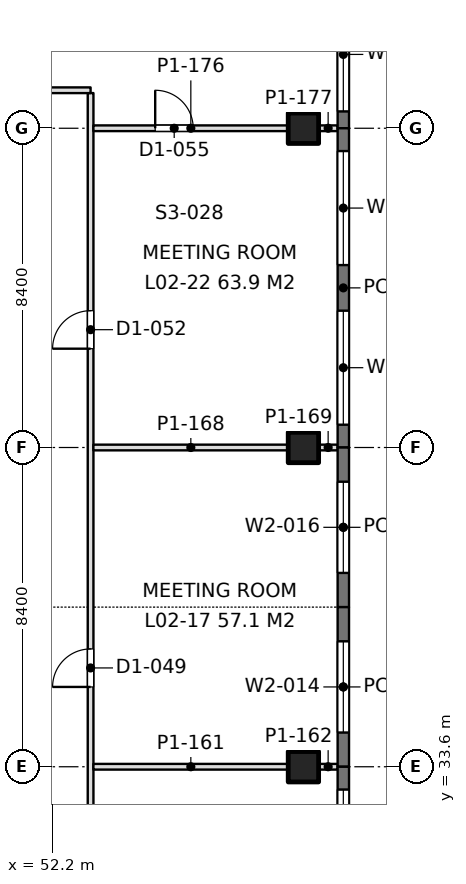
"""IFC4 building model, lengths in metres.
Left out: names, types, materials, properties, quantities, classifications, styles, units other than length and angle.
Written with IfcOpenShell. Run it as: python <this file> out.ifc"""

import sys

from ifc_helpers import new_model, si_unit, direction, frame, frame_2d, origin, origin_2d, place, context, subcontext, project, spatial, rectangle, extrude, element, fill, save


model = new_model("IFC4")
c1 = context("Model", 3, precision=1e-05, world=origin(), true_north=direction((0.0, 1.0)))
c2 = subcontext(c1, "Body", "Model", "MODEL_VIEW")
j1 = project(units=[si_unit("LENGTHUNIT", "METRE"), si_unit("PLANEANGLEUNIT", "RADIAN")], contexts=[c1])
p1 = place(None, origin())
s1 = spatial("IfcSite", under=j1, at=p1, CompositionType="ELEMENT")
p2 = place(p1, origin())
s2 = spatial("IfcBuilding", under=s1, at=p2, CompositionType="ELEMENT")
p3 = place(p2, frame((0.0, 0.0, 9.9)))
s3 = spatial("IfcBuildingStorey", under=s2, at=p3, CompositionType="ELEMENT", Elevation=9.9)
for number, where, z_axis, x_axis in (
    (1, (58.8, 33.6, 0.0), (0.0, 0.0, 1.0), (1.0, 0.0, 0.0)),
    (2, (58.8, 42.0, 0.0), (0.0, 0.0, 1.0), (1.0, 0.0, 0.0)),
    (3, (58.8, 50.4, 0.0), (0.0, 0.0, 1.0), (1.0, 0.0, 0.0)),
):
    element("IfcColumn", number, at=place(p3, frame(where, z_axis=z_axis, x_axis=x_axis)), inside=s3, PredefinedType="COLUMN", context=c2, shape_type="SweptSolid", body=[
        extrude(rectangle(XDim=0.8, YDim=0.8, at=origin_2d()), origin(), (0.0, 0.0, 1.0), 4.5),
    ])
p4 = place(p3, frame((59.85, 58.485, 0.0), z_axis=(0.0, 0.0, 1.0), x_axis=(0.0, -1.0, 0.0)))
e4 = element("IfcWall", 4, at=p4, inside=s3, PredefinedType="SOLIDWALL", context=c2, shape_type="SweptSolid", body=[
    extrude(rectangle(XDim=8.085, YDim=0.3, at=frame_2d((4.042, 0.0))), origin(), (0.0, 0.0, 1.0), 4.3),
])
p5 = place(p4, frame((0.443, 0.0, 0.9)))
e5 = element("IfcOpeningElement", 5, at=p5, cuts=e4, PredefinedType="OPENING", context=c2, shape_type="SweptSolid", body=[
    extrude(rectangle(XDim=3.0, YDim=2.4, at=frame_2d((1.5, 1.2))), frame((0.0, 0.16, 0.0), z_axis=(0.0, -1.0, 0.0), x_axis=(1.0, 0.0, 0.0)), (0.0, 0.0, 1.0), 0.32),
])
p6 = place(p4, frame((4.643, 0.0, 0.9)))
e6 = element("IfcOpeningElement", 6, at=p6, cuts=e4, PredefinedType="OPENING", context=c2, shape_type="SweptSolid", body=[
    extrude(rectangle(XDim=3.0, YDim=2.4, at=frame_2d((1.5, 1.2))), frame((0.0, 0.16, 0.0), z_axis=(0.0, -1.0, 0.0), x_axis=(1.0, 0.0, 0.0)), (0.0, 0.0, 1.0), 0.32),
])
p7 = place(p3, frame((59.85, 50.4, 0.0), z_axis=(0.0, 0.0, 1.0), x_axis=(0.0, -1.0, 0.0)))
e7 = element("IfcWall", 7, at=p7, inside=s3, PredefinedType="SOLIDWALL", context=c2, shape_type="SweptSolid", body=[
    extrude(rectangle(XDim=8.4, YDim=0.3, at=frame_2d((4.2, 0.0))), origin(), (0.0, 0.0, 1.0), 4.3),
])
p8 = place(p7, frame((0.6, 0.0, 0.9)))
e8 = element("IfcOpeningElement", 8, at=p8, cuts=e7, PredefinedType="OPENING", context=c2, shape_type="SweptSolid", body=[
    extrude(rectangle(XDim=3.0, YDim=2.4, at=frame_2d((1.5, 1.2))), frame((0.0, 0.16, 0.0), z_axis=(0.0, -1.0, 0.0), x_axis=(1.0, 0.0, 0.0)), (0.0, 0.0, 1.0), 0.32),
])
p9 = place(p7, frame((4.8, 0.0, 0.9)))
e9 = element("IfcOpeningElement", 9, at=p9, cuts=e7, PredefinedType="OPENING", context=c2, shape_type="SweptSolid", body=[
    extrude(rectangle(XDim=3.0, YDim=2.4, at=frame_2d((1.5, 1.2))), frame((0.0, 0.16, 0.0), z_axis=(0.0, -1.0, 0.0), x_axis=(1.0, 0.0, 0.0)), (0.0, 0.0, 1.0), 0.32),
])
p10 = place(p3, frame((59.85, 42.0, 0.0), z_axis=(0.0, 0.0, 1.0), x_axis=(0.0, -1.0, 0.0)))
e10 = element("IfcWall", 10, at=p10, inside=s3, PredefinedType="SOLIDWALL", context=c2, shape_type="SweptSolid", body=[
    extrude(rectangle(XDim=4.2, YDim=0.3, at=frame_2d((2.1, 0.0))), origin(), (0.0, 0.0, 1.0), 4.3),
])
p11 = place(p10, frame((0.9, 0.0, 0.9)))
e11 = element("IfcOpeningElement", 11, at=p11, cuts=e10, PredefinedType="OPENING", context=c2, shape_type="SweptSolid", body=[
    extrude(rectangle(XDim=2.4, YDim=1.9, at=frame_2d((1.2, 0.95))), frame((0.0, 0.16, 0.0), z_axis=(0.0, -1.0, 0.0), x_axis=(1.0, 0.0, 0.0)), (0.0, 0.0, 1.0), 0.32),
])
p12 = place(p3, frame((59.85, 37.8, 0.0), z_axis=(0.0, 0.0, 1.0), x_axis=(0.0, -1.0, 0.0)))
e12 = element("IfcWall", 12, at=p12, inside=s3, PredefinedType="SOLIDWALL", context=c2, shape_type="SweptSolid", body=[
    extrude(rectangle(XDim=4.2, YDim=0.3, at=frame_2d((2.1, 0.0))), origin(), (0.0, 0.0, 1.0), 4.3),
])
p13 = place(p12, frame((0.9, 0.0, 0.9)))
e13 = element("IfcOpeningElement", 13, at=p13, cuts=e12, PredefinedType="OPENING", context=c2, shape_type="SweptSolid", body=[
    extrude(rectangle(XDim=2.4, YDim=1.9, at=frame_2d((1.2, 0.95))), frame((0.0, 0.16, 0.0), z_axis=(0.0, -1.0, 0.0), x_axis=(1.0, 0.0, 0.0)), (0.0, 0.0, 1.0), 0.32),
])
p14 = place(p3, frame((59.85, 33.6, 0.0), z_axis=(0.0, 0.0, 1.0), x_axis=(0.0, -1.0, 0.0)))
e14 = element("IfcWall", 14, at=p14, inside=s3, PredefinedType="SOLIDWALL", context=c2, shape_type="SweptSolid", body=[
    extrude(rectangle(XDim=8.4, YDim=0.3, at=frame_2d((4.2, 0.0))), origin(), (0.0, 0.0, 1.0), 4.3),
])
p15 = place(p14, frame((0.6, 0.0, 0.9)))
e15 = element("IfcOpeningElement", 15, at=p15, cuts=e14, PredefinedType="OPENING", context=c2, shape_type="SweptSolid", body=[
    extrude(rectangle(XDim=3.0, YDim=2.4, at=frame_2d((1.5, 1.2))), frame((0.0, 0.16, 0.0), z_axis=(0.0, -1.0, 0.0), x_axis=(1.0, 0.0, 0.0)), (0.0, 0.0, 1.0), 0.32),
])
p16 = place(p14, frame((4.8, 0.0, 0.9)))
e16 = element("IfcOpeningElement", 16, at=p16, cuts=e14, PredefinedType="OPENING", context=c2, shape_type="SweptSolid", body=[
    extrude(rectangle(XDim=3.0, YDim=2.4, at=frame_2d((1.5, 1.2))), frame((0.0, 0.16, 0.0), z_axis=(0.0, -1.0, 0.0), x_axis=(1.0, 0.0, 0.0)), (0.0, 0.0, 1.0), 0.32),
])
p17 = place(p3, frame((49.02, 51.4, 0.0), z_axis=(0.0, 0.0, 1.0), x_axis=(1.0, 0.0, 0.0)))
e17 = element("IfcWall", 17, at=p17, inside=s3, PredefinedType="PARTITIONING", context=c2, shape_type="SweptSolid", body=[
    extrude(rectangle(XDim=4.18, YDim=0.15, at=frame_2d((2.09, 0.0))), origin(), (0.0, 0.0, 1.0), 3.65),
])
p18 = place(p3, frame((53.274, 50.4, 0.0), z_axis=(0.0, 0.0, 1.0), x_axis=(1.0, 0.0, 0.0)))
e18 = element("IfcWall", 18, at=p18, inside=s3, PredefinedType="PARTITIONING", context=c2, shape_type="SweptSolid", body=[
    extrude(rectangle(XDim=5.127, YDim=0.15, at=frame_2d((2.563, 0.0))), origin(), (0.0, 0.0, 1.0), 3.65),
])
p19 = place(p18, frame((1.626, 0.0, 0.0)))
e19 = element("IfcOpeningElement", 19, at=p19, cuts=e18, PredefinedType="OPENING", context=c2, shape_type="SweptSolid", body=[
    extrude(rectangle(XDim=1.0, YDim=2.2, at=frame_2d((0.5, 1.1))), frame((0.0, 0.085, 0.0), z_axis=(0.0, -1.0, 0.0), x_axis=(1.0, 0.0, 0.0)), (0.0, 0.0, 1.0), 0.17),
])
p20 = place(p3, frame((59.199, 50.4, 0.0), z_axis=(0.0, 0.0, 1.0), x_axis=(1.0, 0.0, 0.0)))
e20 = element("IfcWall", 20, at=p20, inside=s3, PredefinedType="PARTITIONING", context=c2, shape_type="SweptSolid", body=[
    extrude(rectangle(XDim=0.503, YDim=0.15, at=frame_2d((0.251, 0.0))), origin(), (0.0, 0.0, 1.0), 4.3),
])
p21 = place(p3, frame((53.2, 8.4, 0.0), z_axis=(0.0, 0.0, 1.0), x_axis=(0.0, 1.0, 0.0)))
e21 = element("IfcWall", 21, at=p21, inside=s3, PredefinedType="PARTITIONING", context=c2, shape_type="SweptSolid", body=[
    extrude(rectangle(XDim=42.926, YDim=0.15, at=frame_2d((21.463, 0.0))), origin(), (0.0, 0.0, 1.0), 3.65),
])
p22 = place(p21, frame((2.1, 0.0, 0.0)))
e22 = element("IfcOpeningElement", 22, at=p22, cuts=e21, PredefinedType="OPENING", context=c2, shape_type="SweptSolid", body=[
    extrude(rectangle(XDim=1.0, YDim=2.2, at=frame_2d((0.5, 1.1))), frame((0.0, 0.085, 0.0), z_axis=(0.0, -1.0, 0.0), x_axis=(1.0, 0.0, 0.0)), (0.0, 0.0, 1.0), 0.17),
])
p23 = place(p21, frame((10.5, 0.0, 0.0)))
e23 = element("IfcOpeningElement", 23, at=p23, cuts=e21, PredefinedType="OPENING", context=c2, shape_type="SweptSolid", body=[
    extrude(rectangle(XDim=1.0, YDim=2.2, at=frame_2d((0.5, 1.1))), frame((0.0, 0.085, 0.0), z_axis=(0.0, -1.0, 0.0), x_axis=(1.0, 0.0, 0.0)), (0.0, 0.0, 1.0), 0.17),
])
p24 = place(p21, frame((18.9, 0.0, 0.0)))
e24 = element("IfcOpeningElement", 24, at=p24, cuts=e21, PredefinedType="OPENING", context=c2, shape_type="SweptSolid", body=[
    extrude(rectangle(XDim=1.0, YDim=2.2, at=frame_2d((0.5, 1.1))), frame((0.0, 0.085, 0.0), z_axis=(0.0, -1.0, 0.0), x_axis=(1.0, 0.0, 0.0)), (0.0, 0.0, 1.0), 0.17),
])
p25 = place(p21, frame((27.3, 0.0, 0.0)))
e25 = element("IfcOpeningElement", 25, at=p25, cuts=e21, PredefinedType="OPENING", context=c2, shape_type="SweptSolid", body=[
    extrude(rectangle(XDim=1.0, YDim=2.2, at=frame_2d((0.5, 1.1))), frame((0.0, 0.085, 0.0), z_axis=(0.0, -1.0, 0.0), x_axis=(1.0, 0.0, 0.0)), (0.0, 0.0, 1.0), 0.17),
])
p26 = place(p21, frame((36.2, 0.0, 0.0)))
e26 = element("IfcOpeningElement", 26, at=p26, cuts=e21, PredefinedType="OPENING", context=c2, shape_type="SweptSolid", body=[
    extrude(rectangle(XDim=1.0, YDim=2.2, at=frame_2d((0.5, 1.1))), frame((0.0, 0.085, 0.0), z_axis=(0.0, -1.0, 0.0), x_axis=(1.0, 0.0, 0.0)), (0.0, 0.0, 1.0), 0.17),
])
p27 = place(p3, frame((53.274, 33.6, 0.0), z_axis=(0.0, 0.0, 1.0), x_axis=(1.0, 0.0, 0.0)))
e27 = element("IfcWall", 27, at=p27, inside=s3, PredefinedType="PARTITIONING", context=c2, shape_type="SweptSolid", body=[
    extrude(rectangle(XDim=5.127, YDim=0.15, at=frame_2d((2.563, 0.0))), origin(), (0.0, 0.0, 1.0), 3.65),
])
p28 = place(p3, frame((59.199, 33.6, 0.0), z_axis=(0.0, 0.0, 1.0), x_axis=(1.0, 0.0, 0.0)))
e28 = element("IfcWall", 28, at=p28, inside=s3, PredefinedType="PARTITIONING", context=c2, shape_type="SweptSolid", body=[
    extrude(rectangle(XDim=0.503, YDim=0.15, at=frame_2d((0.251, 0.0))), origin(), (0.0, 0.0, 1.0), 4.3),
])
p29 = place(p3, frame((53.274, 42.0, 0.0), z_axis=(0.0, 0.0, 1.0), x_axis=(1.0, 0.0, 0.0)))
e29 = element("IfcWall", 29, at=p29, inside=s3, PredefinedType="PARTITIONING", context=c2, shape_type="SweptSolid", body=[
    extrude(rectangle(XDim=5.127, YDim=0.15, at=frame_2d((2.563, 0.0))), origin(), (0.0, 0.0, 1.0), 3.65),
])
p30 = place(p3, frame((59.199, 42.0, 0.0), z_axis=(0.0, 0.0, 1.0), x_axis=(1.0, 0.0, 0.0)))
e30 = element("IfcWall", 30, at=p30, inside=s3, PredefinedType="PARTITIONING", context=c2, shape_type="SweptSolid", body=[
    extrude(rectangle(XDim=0.503, YDim=0.15, at=frame_2d((0.251, 0.0))), origin(), (0.0, 0.0, 1.0), 4.3),
])
p31 = place(p6, origin())
e31 = element("IfcWindow", 31, at=p31, inside=s3, PartitioningType="SINGLE_PANEL", PredefinedType="WINDOW", context=c2, shape_type="SweptSolid", body=[
    extrude(rectangle(XDim=3.0, YDim=2.4, at=frame_2d((1.5, 1.2))), frame((0.0, 0.03, 0.0), z_axis=(0.0, -1.0, 0.0), x_axis=(1.0, 0.0, 0.0)), (0.0, 0.0, 1.0), 0.06),
])
fill(e6, e31)
p32 = place(p8, origin())
e32 = element("IfcWindow", 32, at=p32, inside=s3, PartitioningType="SINGLE_PANEL", PredefinedType="WINDOW", context=c2, shape_type="SweptSolid", body=[
    extrude(rectangle(XDim=3.0, YDim=2.4, at=frame_2d((1.5, 1.2))), frame((0.0, 0.03, 0.0), z_axis=(0.0, -1.0, 0.0), x_axis=(1.0, 0.0, 0.0)), (0.0, 0.0, 1.0), 0.06),
])
fill(e8, e32)
p33 = place(p9, origin())
e33 = element("IfcWindow", 33, at=p33, inside=s3, PartitioningType="SINGLE_PANEL", PredefinedType="WINDOW", context=c2, shape_type="SweptSolid", body=[
    extrude(rectangle(XDim=3.0, YDim=2.4, at=frame_2d((1.5, 1.2))), frame((0.0, 0.03, 0.0), z_axis=(0.0, -1.0, 0.0), x_axis=(1.0, 0.0, 0.0)), (0.0, 0.0, 1.0), 0.06),
])
fill(e9, e33)
p34 = place(p11, origin())
e34 = element("IfcWindow", 34, at=p34, inside=s3, PartitioningType="SINGLE_PANEL", PredefinedType="WINDOW", context=c2, shape_type="SweptSolid", body=[
    extrude(rectangle(XDim=2.4, YDim=1.9, at=frame_2d((1.2, 0.95))), frame((0.0, 0.03, 0.0), z_axis=(0.0, -1.0, 0.0), x_axis=(1.0, 0.0, 0.0)), (0.0, 0.0, 1.0), 0.06),
])
fill(e11, e34)
p35 = place(p13, origin())
e35 = element("IfcWindow", 35, at=p35, inside=s3, PartitioningType="SINGLE_PANEL", PredefinedType="WINDOW", context=c2, shape_type="SweptSolid", body=[
    extrude(rectangle(XDim=2.4, YDim=1.9, at=frame_2d((1.2, 0.95))), frame((0.0, 0.03, 0.0), z_axis=(0.0, -1.0, 0.0), x_axis=(1.0, 0.0, 0.0)), (0.0, 0.0, 1.0), 0.06),
])
fill(e13, e35)
p36 = place(p15, origin())
e36 = element("IfcWindow", 36, at=p36, inside=s3, PartitioningType="SINGLE_PANEL", PredefinedType="WINDOW", context=c2, shape_type="SweptSolid", body=[
    extrude(rectangle(XDim=3.0, YDim=2.4, at=frame_2d((1.5, 1.2))), frame((0.0, 0.03, 0.0), z_axis=(0.0, -1.0, 0.0), x_axis=(1.0, 0.0, 0.0)), (0.0, 0.0, 1.0), 0.06),
])
fill(e15, e36)
p37 = place(p19, origin())
e37 = element("IfcDoor", 37, at=p37, inside=s3, OperationType="SINGLE_SWING_LEFT", PredefinedType="DOOR", context=c2, shape_type="SweptSolid", body=[
    extrude(rectangle(XDim=1.0, YDim=2.2, at=frame_2d((0.5, 1.1))), frame((0.0, 0.025, 0.0), z_axis=(0.0, -1.0, 0.0), x_axis=(1.0, 0.0, 0.0)), (0.0, 0.0, 1.0), 0.05),
])
fill(e19, e37)
p38 = place(p25, origin())
e38 = element("IfcDoor", 38, at=p38, inside=s3, OperationType="SINGLE_SWING_LEFT", PredefinedType="DOOR", context=c2, shape_type="SweptSolid", body=[
    extrude(rectangle(XDim=1.0, YDim=2.2, at=frame_2d((0.5, 1.1))), frame((0.0, 0.025, 0.0), z_axis=(0.0, -1.0, 0.0), x_axis=(1.0, 0.0, 0.0)), (0.0, 0.0, 1.0), 0.05),
])
fill(e25, e38)
p39 = place(p26, origin())
e39 = element("IfcDoor", 39, at=p39, inside=s3, OperationType="SINGLE_SWING_LEFT", PredefinedType="DOOR", context=c2, shape_type="SweptSolid", body=[
    extrude(rectangle(XDim=1.0, YDim=2.2, at=frame_2d((0.5, 1.1))), frame((0.0, 0.025, 0.0), z_axis=(0.0, -1.0, 0.0), x_axis=(1.0, 0.0, 0.0)), (0.0, 0.0, 1.0), 0.05),
])
fill(e26, e39)
save(model, sys.argv[1])
